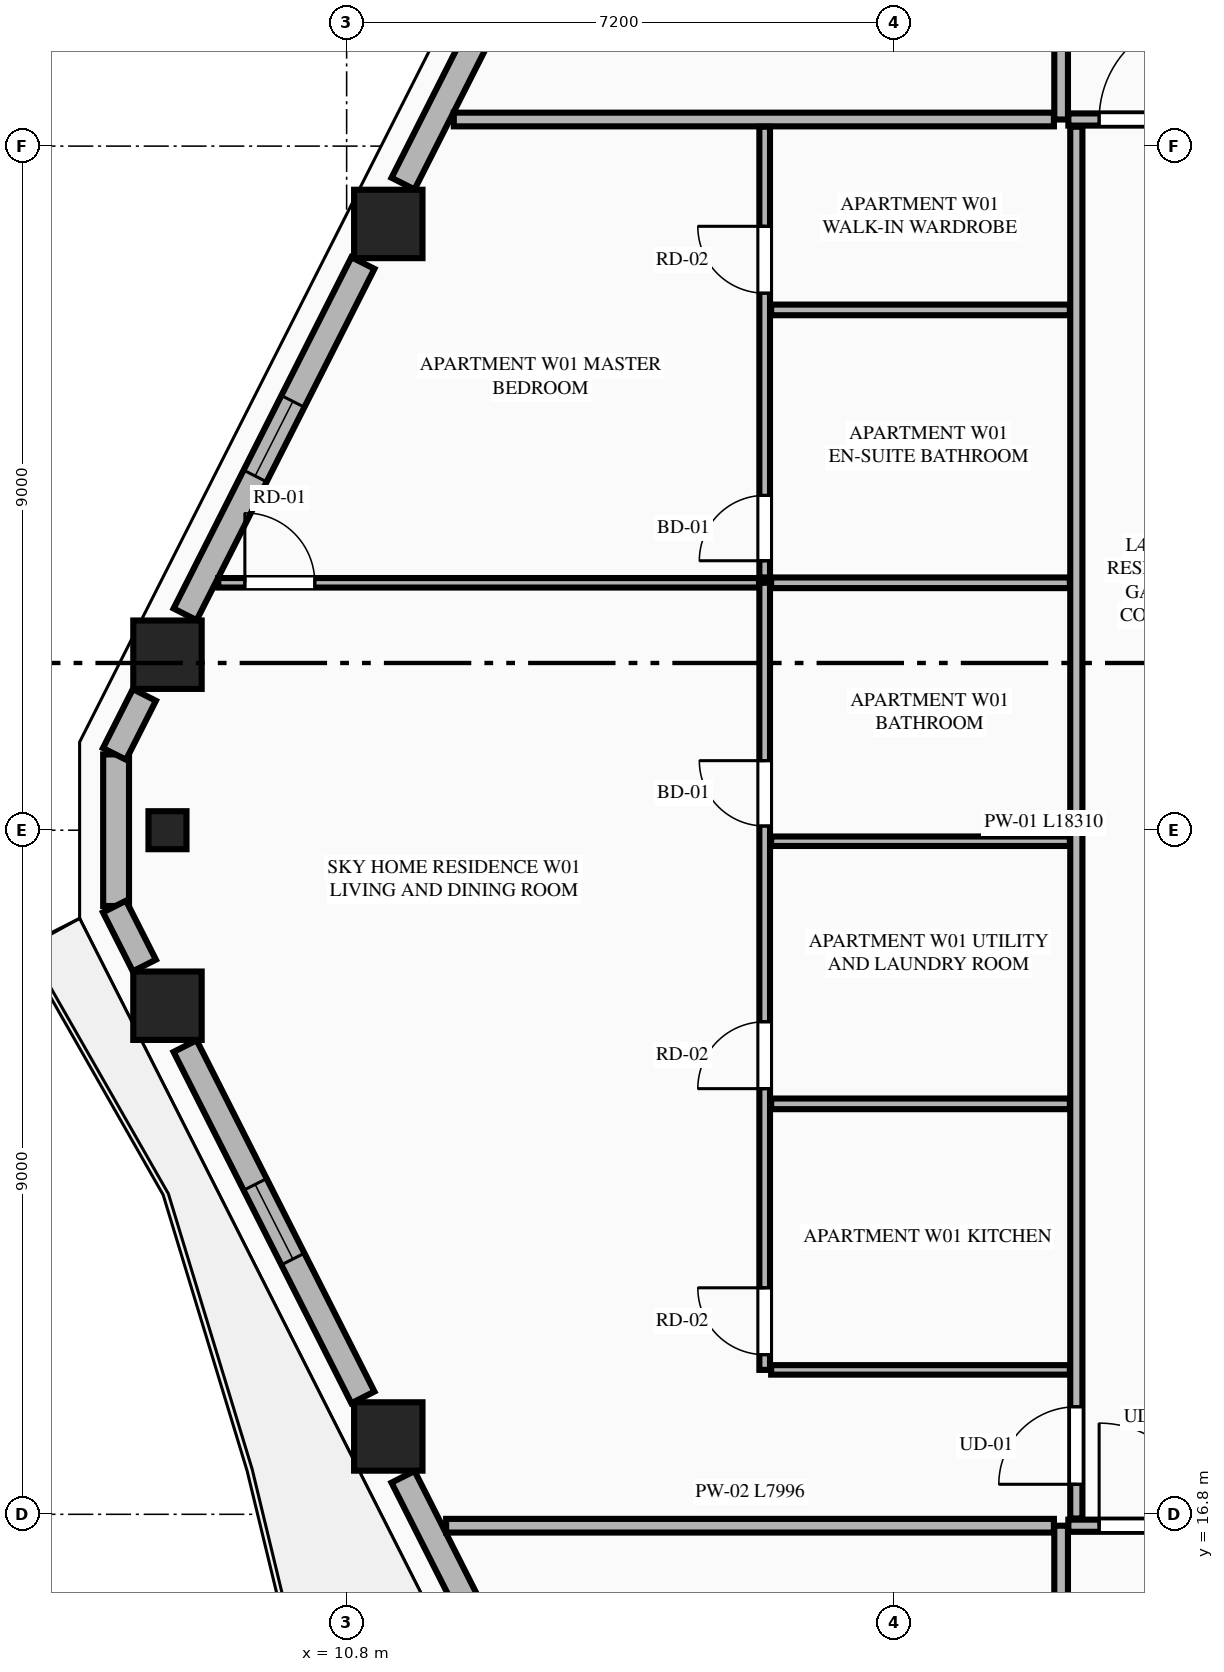
"""IFC4 building model, lengths in metres.
Left out: names, types, materials, properties, quantities, classifications, styles, units other than length and angle.
Written with IfcOpenShell. Run it as: python <this file> out.ifc"""

import sys

from ifc_helpers import new_model, si_unit, direction, frame, frame_2d, origin, origin_2d, place, context, subcontext, project, spatial, rectangle, extrude, element, fill, save


model = new_model("IFC4")
c1 = context("Model", 3, precision=1e-05, world=origin(), true_north=direction((0.0, 1.0)))
c2 = subcontext(c1, "Body", "Model", "MODEL_VIEW")
j1 = project(units=[si_unit("LENGTHUNIT", "METRE"), si_unit("PLANEANGLEUNIT", "RADIAN")], contexts=[c1])
p1 = place(None, origin())
s1 = spatial("IfcSite", under=j1, at=p1, CompositionType="ELEMENT")
p2 = place(p1, origin())
s2 = spatial("IfcBuilding", under=s1, at=p2, CompositionType="ELEMENT")
p3 = place(p2, frame((0.0, 0.0, 153.5)))
s3 = spatial("IfcBuildingStorey", under=s2, at=p3, CompositionType="ELEMENT", Elevation=153.5)
for number, where, z_axis, x_axis in (
    (1, (11.348, 33.776, 0.0), (0.0, 0.0, 1.0), (1.0, 0.0, 0.0)),
    (2, (8.443, 28.109, 0.0), (0.0, 0.0, 1.0), (1.0, 0.0, 0.0)),
    (3, (8.443, 23.491, 0.0), (0.0, 0.0, 1.0), (1.0, 0.0, 0.0)),
    (4, (11.348, 17.824, 0.0), (0.0, 0.0, 1.0), (1.0, 0.0, 0.0)),
):
    element("IfcColumn", number, at=place(p3, frame(where, z_axis=z_axis, x_axis=x_axis)), inside=s3, PredefinedType="COLUMN", context=c2, shape_type="SweptSolid", body=[
        extrude(rectangle(XDim=0.9, YDim=0.9, at=origin_2d()), origin(), (0.0, 0.0, 1.0), 3.55),
    ])
p4 = place(p3, frame((8.443, 25.8, 0.0), z_axis=(0.0, 0.0, 1.0), x_axis=(0.0, -1.0, 0.0)))
e5 = element("IfcColumn", 5, at=p4, inside=s3, PredefinedType="PILASTER", context=c2, shape_type="SweptSolid", body=[
    extrude(rectangle(XDim=0.5, YDim=0.35, at=origin_2d()), origin(), (0.0, 0.0, 1.0), 3.55),
])
p5 = place(p3, frame((7.767, 26.797, 0.0), z_axis=(0.0, 0.0, 1.0), x_axis=(0.0, -1.0, 0.0)))
e6 = element("IfcWall", 6, at=p5, inside=s3, PredefinedType="STANDARD", context=c2, shape_type="SweptSolid", body=[
    extrude(rectangle(XDim=1.994, YDim=0.34, at=frame_2d((0.997, 0.0))), origin(), (0.0, 0.0, 1.0), 3.34),
])
p6 = place(p3, frame((13.982, 39.129, 0.0), z_axis=(0.0, 0.0, 1.0), x_axis=(-0.451491174807, -0.892275584711, 0.0)))
e7 = element("IfcWall", 7, at=p6, inside=s3, PredefinedType="STANDARD", context=c2, shape_type="SweptSolid", body=[
    extrude(rectangle(XDim=5.404, YDim=0.34, at=frame_2d((2.702, 0.0))), origin(), (0.0, 0.0, 1.0), 2.797),
])
p7 = place(p6, frame((2.152, 0.0, 0.75)))
e8 = element("IfcOpeningElement", 8, at=p7, cuts=e7, PredefinedType="OPENING", context=c2, shape_type="SweptSolid", body=[
    extrude(rectangle(XDim=1.1, YDim=1.897, at=frame_2d((0.55, 0.948))), frame((0.0, 0.18, 0.0), z_axis=(0.0, -1.0, 0.0), x_axis=(1.0, 0.0, 0.0)), (0.0, 0.0, 1.0), 0.36),
])
p8 = place(p3, frame((11.014, 33.262, 0.0), z_axis=(0.0, 0.0, 1.0), x_axis=(-0.451506699894, -0.892267728852, 0.0)))
e9 = element("IfcWall", 9, at=p8, inside=s3, PredefinedType="STANDARD", context=c2, shape_type="SweptSolid", body=[
    extrude(rectangle(XDim=5.18, YDim=0.34, at=frame_2d((2.59, 0.0))), origin(), (0.0, 0.0, 1.0), 2.797),
])
p9 = place(p8, frame((2.04, 0.0, 0.75)))
e10 = element("IfcOpeningElement", 10, at=p9, cuts=e9, PredefinedType="OPENING", context=c2, shape_type="SweptSolid", body=[
    extrude(rectangle(XDim=1.1, YDim=1.897, at=frame_2d((0.55, 0.948))), frame((0.0, 0.18, 0.0), z_axis=(0.0, -1.0, 0.0), x_axis=(1.0, 0.0, 0.0)), (0.0, 0.0, 1.0), 0.36),
])
p10 = place(p3, frame((8.139, 27.58, 0.0), z_axis=(0.0, 0.0, 1.0), x_axis=(-0.451586578297, -0.892227304168, 0.0)))
e11 = element("IfcWall", 11, at=p10, inside=s3, PredefinedType="STANDARD", context=c2, shape_type="SweptSolid", body=[
    extrude(rectangle(XDim=0.87, YDim=0.34, at=frame_2d((0.435, 0.0))), origin(), (0.0, 0.0, 1.0), 3.34),
])
p11 = place(p3, frame((7.746, 24.796, 0.0), z_axis=(0.0, 0.0, 1.0), x_axis=(0.451699687084, -0.892170046957, 0.0)))
e12 = element("IfcWall", 12, at=p11, inside=s3, PredefinedType="STANDARD", context=c2, shape_type="SweptSolid", body=[
    extrude(rectangle(XDim=0.87, YDim=0.34, at=frame_2d((0.435, 0.0))), origin(), (0.0, 0.0, 1.0), 3.34),
])
p12 = place(p3, frame((8.675, 22.96, 0.0), z_axis=(0.0, 0.0, 1.0), x_axis=(0.451506699894, -0.892267728852, 0.0)))
e13 = element("IfcWall", 13, at=p12, inside=s3, PredefinedType="STANDARD", context=c2, shape_type="SweptSolid", body=[
    extrude(rectangle(XDim=5.18, YDim=0.34, at=frame_2d((2.59, 0.0))), origin(), (0.0, 0.0, 1.0), 2.797),
])
p13 = place(p12, frame((2.04, 0.0, 0.75)))
e14 = element("IfcOpeningElement", 14, at=p13, cuts=e13, PredefinedType="OPENING", context=c2, shape_type="SweptSolid", body=[
    extrude(rectangle(XDim=1.1, YDim=1.897, at=frame_2d((0.55, 0.948))), frame((0.0, 0.18, 0.0), z_axis=(0.0, -1.0, 0.0), x_axis=(1.0, 0.0, 0.0)), (0.0, 0.0, 1.0), 0.36),
])
p14 = place(p3, frame((11.542, 17.293, 0.0), z_axis=(0.0, 0.0, 1.0), x_axis=(0.451491174807, -0.892275584711, 0.0)))
e15 = element("IfcWall", 15, at=p14, inside=s3, PredefinedType="STANDARD", context=c2, shape_type="SweptSolid", body=[
    extrude(rectangle(XDim=5.404, YDim=0.34, at=frame_2d((2.702, 0.0))), origin(), (0.0, 0.0, 1.0), 2.797),
])
p15 = place(p14, frame((2.637, 0.0, 0.0)))
e16 = element("IfcOpeningElement", 16, at=p15, cuts=e15, PredefinedType="OPENING", context=c2, shape_type="SweptSolid", body=[
    extrude(rectangle(XDim=1.1, YDim=2.25, at=frame_2d((0.55, 1.125))), frame((0.0, 0.18, 0.0), z_axis=(0.0, -1.0, 0.0), x_axis=(1.0, 0.0, 0.0)), (0.0, 0.0, 1.0), 0.36),
])
p16 = place(p3, frame((20.2, 4.105, 0.0), z_axis=(0.0, 0.0, 1.0), x_axis=(0.0, 1.0, 0.0)))
e17 = element("IfcWall", 17, at=p16, inside=s3, PredefinedType="PARTITIONING", context=c2, shape_type="SweptSolid", body=[
    extrude(rectangle(XDim=12.545, YDim=0.18, at=frame_2d((6.272, 0.0))), origin(), (0.0, 0.0, 1.0), 3.34),
])
p17 = place(p3, frame((20.295, 16.65, 0.0), z_axis=(0.0, 0.0, 1.0), x_axis=(1.0, 0.0, 0.0)))
e18 = element("IfcWall", 18, at=p17, inside=s3, PredefinedType="PARTITIONING", context=c2, shape_type="SweptSolid", body=[
    extrude(rectangle(XDim=15.842, YDim=0.16, at=frame_2d((7.921, 0.0))), origin(), (0.0, 0.0, 1.0), 3.34),
])
p18 = place(p17, frame((0.405, 0.0, 0.0)))
e19 = element("IfcOpeningElement", 19, at=p18, cuts=e18, PredefinedType="OPENING", context=c2, shape_type="SweptSolid", body=[
    extrude(rectangle(XDim=1.35, YDim=2.35, at=frame_2d((0.675, 1.175))), frame((0.0, 0.09, 0.0), z_axis=(0.0, -1.0, 0.0), x_axis=(1.0, 0.0, 0.0)), (0.0, 0.0, 1.0), 0.18),
])
p19 = place(p3, frame((20.2, 35.15, 0.0), z_axis=(0.0, 0.0, 1.0), x_axis=(0.0, 1.0, 0.0)))
e20 = element("IfcWall", 20, at=p19, inside=s3, PredefinedType="PARTITIONING", context=c2, shape_type="SweptSolid", body=[
    extrude(rectangle(XDim=12.345, YDim=0.18, at=frame_2d((6.173, 0.0))), origin(), (0.0, 0.0, 1.0), 3.34),
])
p20 = place(p3, frame((20.295, 35.15, 0.0), z_axis=(0.0, 0.0, 1.0), x_axis=(1.0, 0.0, 0.0)))
e21 = element("IfcWall", 21, at=p20, inside=s3, PredefinedType="PARTITIONING", context=c2, shape_type="SweptSolid", body=[
    extrude(rectangle(XDim=24.21, YDim=0.16, at=frame_2d((12.105, 0.0))), origin(), (0.0, 0.0, 1.0), 3.34),
])
p21 = place(p20, frame((0.405, 0.0, 0.0)))
e22 = element("IfcOpeningElement", 22, at=p21, cuts=e21, PredefinedType="OPENING", context=c2, shape_type="SweptSolid", body=[
    extrude(rectangle(XDim=1.35, YDim=2.35, at=frame_2d((0.675, 1.175))), frame((0.0, 0.09, 0.0), z_axis=(0.0, -1.0, 0.0), x_axis=(1.0, 0.0, 0.0)), (0.0, 0.0, 1.0), 0.18),
])
p22 = place(p3, frame((12.109, 16.65, 0.0), z_axis=(0.0, 0.0, 1.0), x_axis=(1.0, 0.0, 0.0)))
e23 = element("IfcWall", 23, at=p22, inside=s3, PredefinedType="PARTITIONING", context=c2, shape_type="SweptSolid", body=[
    extrude(rectangle(XDim=7.996, YDim=0.18, at=frame_2d((3.998, 0.0))), origin(), (0.0, 0.0, 1.0), 3.34),
])
p23 = place(p3, frame((12.21, 35.15, 0.0), z_axis=(0.0, 0.0, 1.0), x_axis=(1.0, 0.0, 0.0)))
e24 = element("IfcWall", 24, at=p23, inside=s3, PredefinedType="PARTITIONING", context=c2, shape_type="SweptSolid", body=[
    extrude(rectangle(XDim=7.895, YDim=0.18, at=frame_2d((3.948, 0.0))), origin(), (0.0, 0.0, 1.0), 3.34),
])
p24 = place(p3, frame((20.4, 16.745, 0.0), z_axis=(0.0, 0.0, 1.0), x_axis=(0.0, 1.0, 0.0)))
e25 = element("IfcWall", 25, at=p24, inside=s3, PredefinedType="PARTITIONING", context=c2, shape_type="SweptSolid", body=[
    extrude(rectangle(XDim=18.31, YDim=0.16, at=frame_2d((9.155, 0.0))), origin(), (0.0, 0.0, 1.0), 3.34),
])
p25 = place(p24, frame((0.45, 0.0, 0.0)))
e26 = element("IfcOpeningElement", 26, at=p25, cuts=e25, PredefinedType="OPENING", context=c2, shape_type="SweptSolid", body=[
    extrude(rectangle(XDim=1.02, YDim=2.25, at=frame_2d((0.51, 1.125))), frame((0.0, 0.09, 0.0), z_axis=(0.0, -1.0, 0.0), x_axis=(1.0, 0.0, 0.0)), (0.0, 0.0, 1.0), 0.18),
])
p26 = place(p3, frame((16.385, 18.7, 0.0), z_axis=(0.0, 0.0, 1.0), x_axis=(1.0, 0.0, 0.0)))
e27 = element("IfcWall", 27, at=p26, inside=s3, PredefinedType="PARTITIONING", context=c2, shape_type="SweptSolid", body=[
    extrude(rectangle(XDim=3.93, YDim=0.125, at=frame_2d((1.965, 0.0))), origin(), (0.0, 0.0, 1.0), 2.722),
])
p27 = place(p3, frame((16.3, 18.7, 0.0), z_axis=(0.0, 0.0, 1.0), x_axis=(0.0, 1.0, 0.0)))
e28 = element("IfcWall", 28, at=p27, inside=s3, PredefinedType="PLUMBINGWALL", context=c2, shape_type="SweptSolid", body=[
    extrude(rectangle(XDim=10.355, YDim=0.14, at=frame_2d((5.177, 0.0))), origin(), (0.0, 0.0, 1.0), 3.34),
])
p28 = place(p27, frame((0.2, 0.0, 0.0)))
e29 = element("IfcOpeningElement", 29, at=p28, cuts=e28, PredefinedType="OPENING", context=c2, shape_type="SweptSolid", body=[
    extrude(rectangle(XDim=0.88, YDim=2.15, at=frame_2d((0.44, 1.075))), frame((0.0, 0.08, 0.0), z_axis=(0.0, -1.0, 0.0), x_axis=(1.0, 0.0, 0.0)), (0.0, 0.0, 1.0), 0.16),
])
p29 = place(p27, frame((3.7, 0.0, 0.0)))
e30 = element("IfcOpeningElement", 30, at=p29, cuts=e28, PredefinedType="OPENING", context=c2, shape_type="SweptSolid", body=[
    extrude(rectangle(XDim=0.88, YDim=2.15, at=frame_2d((0.44, 1.075))), frame((0.0, 0.08, 0.0), z_axis=(0.0, -1.0, 0.0), x_axis=(1.0, 0.0, 0.0)), (0.0, 0.0, 1.0), 0.16),
])
p30 = place(p27, frame((7.155, 0.0, 0.0)))
e31 = element("IfcOpeningElement", 31, at=p30, cuts=e28, PredefinedType="OPENING", context=c2, shape_type="SweptSolid", body=[
    extrude(rectangle(XDim=0.86, YDim=2.1, at=frame_2d((0.43, 1.05))), frame((0.0, 0.08, 0.0), z_axis=(0.0, -1.0, 0.0), x_axis=(1.0, 0.0, 0.0)), (0.0, 0.0, 1.0), 0.16),
])
p31 = place(p3, frame((16.3, 29.125, 0.0), z_axis=(0.0, 0.0, 1.0), x_axis=(0.0, 1.0, 0.0)))
e32 = element("IfcWall", 32, at=p31, inside=s3, PredefinedType="PLUMBINGWALL", context=c2, shape_type="SweptSolid", body=[
    extrude(rectangle(XDim=5.93, YDim=0.14, at=frame_2d((2.965, 0.0))), origin(), (0.0, 0.0, 1.0), 3.34),
])
p32 = place(p31, frame((0.22, 0.0, 0.0)))
e33 = element("IfcOpeningElement", 33, at=p32, cuts=e32, PredefinedType="OPENING", context=c2, shape_type="SweptSolid", body=[
    extrude(rectangle(XDim=0.86, YDim=2.1, at=frame_2d((0.43, 1.05))), frame((0.0, 0.08, 0.0), z_axis=(0.0, -1.0, 0.0), x_axis=(1.0, 0.0, 0.0)), (0.0, 0.0, 1.0), 0.16),
])
p33 = place(p31, frame((3.74, 0.0, 0.0)))
e34 = element("IfcOpeningElement", 34, at=p33, cuts=e32, PredefinedType="OPENING", context=c2, shape_type="SweptSolid", body=[
    extrude(rectangle(XDim=0.88, YDim=2.15, at=frame_2d((0.44, 1.075))), frame((0.0, 0.08, 0.0), z_axis=(0.0, -1.0, 0.0), x_axis=(1.0, 0.0, 0.0)), (0.0, 0.0, 1.0), 0.16),
])
p34 = place(p3, frame((16.385, 29.055, 0.0), z_axis=(0.0, 0.0, 1.0), x_axis=(1.0, 0.0, 0.0)))
e35 = element("IfcWall", 35, at=p34, inside=s3, PredefinedType="PLUMBINGWALL", context=c2, shape_type="SweptSolid", body=[
    extrude(rectangle(XDim=3.93, YDim=0.14, at=frame_2d((1.965, 0.0))), origin(), (0.0, 0.0, 1.0), 3.34),
])
p35 = place(p3, frame((9.111, 29.055, 0.0), z_axis=(0.0, 0.0, 1.0), x_axis=(1.0, 0.0, 0.0)))
e36 = element("IfcWall", 36, at=p35, inside=s3, PredefinedType="PARTITIONING", context=c2, shape_type="SweptSolid", body=[
    extrude(rectangle(XDim=7.114, YDim=0.125, at=frame_2d((3.557, 0.0))), origin(), (0.0, 0.0, 1.0), 3.34),
])
p36 = place(p35, frame((0.35, 0.0, 0.0)))
e37 = element("IfcOpeningElement", 37, at=p36, cuts=e36, PredefinedType="OPENING", context=c2, shape_type="SweptSolid", body=[
    extrude(rectangle(XDim=0.92, YDim=2.15, at=frame_2d((0.46, 1.075))), frame((0.0, 0.073, 0.0), z_axis=(0.0, -1.0, 0.0), x_axis=(1.0, 0.0, 0.0)), (0.0, 0.0, 1.0), 0.145),
])
p37 = place(p3, frame((16.385, 22.2, 0.0), z_axis=(0.0, 0.0, 1.0), x_axis=(1.0, 0.0, 0.0)))
e38 = element("IfcWall", 38, at=p37, inside=s3, PredefinedType="PLUMBINGWALL", context=c2, shape_type="SweptSolid", body=[
    extrude(rectangle(XDim=3.93, YDim=0.14, at=frame_2d((1.965, 0.0))), origin(), (0.0, 0.0, 1.0), 3.34),
])
p38 = place(p3, frame((16.385, 25.655, 0.0), z_axis=(0.0, 0.0, 1.0), x_axis=(1.0, 0.0, 0.0)))
e39 = element("IfcWall", 39, at=p38, inside=s3, PredefinedType="PARTITIONING", context=c2, shape_type="SweptSolid", body=[
    extrude(rectangle(XDim=3.93, YDim=0.125, at=frame_2d((1.965, 0.0))), origin(), (0.0, 0.0, 1.0), 3.34),
])
p39 = place(p3, frame((16.385, 32.645, 0.0), z_axis=(0.0, 0.0, 1.0), x_axis=(1.0, 0.0, 0.0)))
e40 = element("IfcWall", 40, at=p39, inside=s3, PredefinedType="PLUMBINGWALL", context=c2, shape_type="SweptSolid", body=[
    extrude(rectangle(XDim=3.93, YDim=0.14, at=frame_2d((1.965, 0.0))), origin(), (0.0, 0.0, 1.0), 3.34),
])
p40 = place(p9, origin())
e41 = element("IfcWindow", 41, at=p40, inside=s3, PartitioningType="SINGLE_PANEL", PredefinedType="WINDOW", context=c2, shape_type="SweptSolid", body=[
    extrude(rectangle(XDim=1.1, YDim=1.897, at=frame_2d((0.55, 0.948))), frame((0.0, 0.03, 0.0), z_axis=(0.0, -1.0, 0.0), x_axis=(1.0, 0.0, 0.0)), (0.0, 0.0, 1.0), 0.06),
])
fill(e10, e41)
p41 = place(p13, origin())
e42 = element("IfcWindow", 42, at=p41, inside=s3, PartitioningType="SINGLE_PANEL", PredefinedType="WINDOW", context=c2, shape_type="SweptSolid", body=[
    extrude(rectangle(XDim=1.1, YDim=1.897, at=frame_2d((0.55, 0.948))), frame((0.0, 0.03, 0.0), z_axis=(0.0, -1.0, 0.0), x_axis=(1.0, 0.0, 0.0)), (0.0, 0.0, 1.0), 0.06),
])
fill(e14, e42)
p42 = place(p18, origin())
e43 = element("IfcDoor", 43, at=p42, inside=s3, OperationType="SINGLE_SWING_LEFT", PredefinedType="DOOR", context=c2, shape_type="SweptSolid", body=[
    extrude(rectangle(XDim=1.35, YDim=2.35, at=frame_2d((0.675, 1.175))), frame((0.0, 0.025, 0.0), z_axis=(0.0, -1.0, 0.0), x_axis=(1.0, 0.0, 0.0)), (0.0, 0.0, 1.0), 0.05),
])
fill(e19, e43)
p43 = place(p21, origin())
e44 = element("IfcDoor", 44, at=p43, inside=s3, OperationType="SINGLE_SWING_RIGHT", PredefinedType="DOOR", context=c2, shape_type="SweptSolid", body=[
    extrude(rectangle(XDim=1.35, YDim=2.35, at=frame_2d((0.675, 1.175))), frame((0.0, 0.025, 0.0), z_axis=(0.0, -1.0, 0.0), x_axis=(1.0, 0.0, 0.0)), (0.0, 0.0, 1.0), 0.05),
])
fill(e22, e44)
p44 = place(p28, origin())
e45 = element("IfcDoor", 45, at=p44, inside=s3, OperationType="SINGLE_SWING_RIGHT", PredefinedType="DOOR", context=c2, shape_type="SweptSolid", body=[
    extrude(rectangle(XDim=0.88, YDim=2.15, at=frame_2d((0.44, 1.075))), frame((0.0, 0.025, 0.0), z_axis=(0.0, -1.0, 0.0), x_axis=(1.0, 0.0, 0.0)), (0.0, 0.0, 1.0), 0.05),
])
fill(e29, e45)
p45 = place(p29, origin())
e46 = element("IfcDoor", 46, at=p45, inside=s3, OperationType="SINGLE_SWING_LEFT", PredefinedType="DOOR", context=c2, shape_type="SweptSolid", body=[
    extrude(rectangle(XDim=0.88, YDim=2.15, at=frame_2d((0.44, 1.075))), frame((0.0, 0.025, 0.0), z_axis=(0.0, -1.0, 0.0), x_axis=(1.0, 0.0, 0.0)), (0.0, 0.0, 1.0), 0.05),
])
fill(e30, e46)
p46 = place(p30, origin())
e47 = element("IfcDoor", 47, at=p46, inside=s3, OperationType="SINGLE_SWING_RIGHT", PredefinedType="DOOR", context=c2, shape_type="SweptSolid", body=[
    extrude(rectangle(XDim=0.86, YDim=2.1, at=frame_2d((0.43, 1.05))), frame((0.0, 0.025, 0.0), z_axis=(0.0, -1.0, 0.0), x_axis=(1.0, 0.0, 0.0)), (0.0, 0.0, 1.0), 0.05),
])
fill(e31, e47)
p47 = place(p32, origin())
e48 = element("IfcDoor", 48, at=p47, inside=s3, OperationType="SINGLE_SWING_LEFT", PredefinedType="DOOR", context=c2, shape_type="SweptSolid", body=[
    extrude(rectangle(XDim=0.86, YDim=2.1, at=frame_2d((0.43, 1.05))), frame((0.0, 0.025, 0.0), z_axis=(0.0, -1.0, 0.0), x_axis=(1.0, 0.0, 0.0)), (0.0, 0.0, 1.0), 0.05),
])
fill(e33, e48)
p48 = place(p33, origin())
e49 = element("IfcDoor", 49, at=p48, inside=s3, OperationType="SINGLE_SWING_RIGHT", PredefinedType="DOOR", context=c2, shape_type="SweptSolid", body=[
    extrude(rectangle(XDim=0.88, YDim=2.15, at=frame_2d((0.44, 1.075))), frame((0.0, 0.025, 0.0), z_axis=(0.0, -1.0, 0.0), x_axis=(1.0, 0.0, 0.0)), (0.0, 0.0, 1.0), 0.05),
])
fill(e34, e49)
p49 = place(p25, origin())
e50 = element("IfcDoor", 50, at=p49, inside=s3, OperationType="SINGLE_SWING_LEFT", PredefinedType="DOOR", context=c2, shape_type="SweptSolid", body=[
    extrude(rectangle(XDim=1.02, YDim=2.25, at=frame_2d((0.51, 1.125))), frame((0.0, 0.025, 0.0), z_axis=(0.0, -1.0, 0.0), x_axis=(1.0, 0.0, 0.0)), (0.0, 0.0, 1.0), 0.05),
])
fill(e26, e50)
p50 = place(p36, origin())
e51 = element("IfcDoor", 51, at=p50, inside=s3, OperationType="SINGLE_SWING_LEFT", PredefinedType="DOOR", context=c2, shape_type="SweptSolid", body=[
    extrude(rectangle(XDim=0.92, YDim=2.15, at=frame_2d((0.46, 1.075))), frame((0.0, 0.025, 0.0), z_axis=(0.0, -1.0, 0.0), x_axis=(1.0, 0.0, 0.0)), (0.0, 0.0, 1.0), 0.05),
])
fill(e37, e51)
save(model, sys.argv[1])
